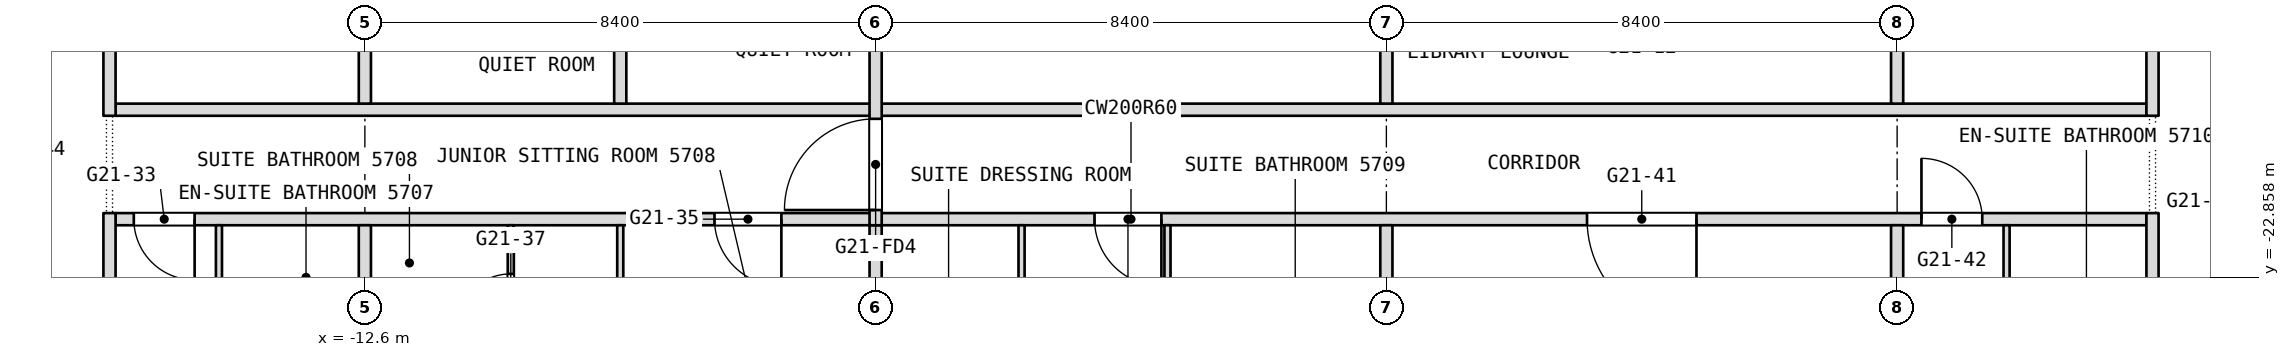
"""IFC4 building model, lengths in metres.
Left out: names, types, materials, properties, quantities, classifications, styles, units other than length and angle.
Written with IfcOpenShell. Run it as: python <this file> out.ifc"""

import sys

from ifc_helpers import new_model, si_unit, direction, frame, frame_2d, origin, place, context, subcontext, project, spatial, rectangle, extrude, element, fill, save


model = new_model("IFC4")
c1 = context("Model", 3, precision=1e-05, world=origin(), true_north=direction((0.0, 1.0)))
c2 = subcontext(c1, "Body", "Model", "MODEL_VIEW")
j1 = project(units=[si_unit("LENGTHUNIT", "METRE"), si_unit("PLANEANGLEUNIT", "RADIAN")], contexts=[c1])
p1 = place(None, origin())
s1 = spatial("IfcSite", under=j1, at=p1, CompositionType="ELEMENT")
p2 = place(p1, origin())
s2 = spatial("IfcBuilding", under=s1, at=p2, CompositionType="ELEMENT")
p3 = place(p2, frame((0.0, 0.0, 241.7)))
s3 = spatial("IfcBuildingStorey", under=s2, at=p3, CompositionType="ELEMENT", Elevation=241.7)
p4 = place(p3, frame((-16.7, -21.9, 0.0), z_axis=(0.0, 0.0, 1.0), x_axis=(1.0, 0.0, 0.0)))
e1 = element("IfcWall", 1, at=p4, inside=s3, PredefinedType="PARTITIONING", context=c2, shape_type="SweptSolid", body=[
    extrude(rectangle(XDim=33.4, YDim=0.2, at=frame_2d((16.7, 0.0))), origin(), (0.0, 0.0, 1.0), 3.34),
])
p5 = place(p4, frame((0.3, 0.0, 0.0)))
e2 = element("IfcOpeningElement", 2, at=p5, cuts=e1, PredefinedType="OPENING", context=c2, shape_type="SweptSolid", body=[
    extrude(rectangle(XDim=1.0, YDim=2.1, at=frame_2d((0.5, 1.05))), frame((0.0, 0.1, 0.0), z_axis=(0.0, -1.0, 0.0), x_axis=(1.0, 0.0, 0.0)), (0.0, 0.0, 1.0), 0.2),
])
p6 = place(p4, frame((9.85, 0.0, 0.0)))
e3 = element("IfcOpeningElement", 3, at=p6, cuts=e1, PredefinedType="OPENING", context=c2, shape_type="SweptSolid", body=[
    extrude(rectangle(XDim=1.1, YDim=2.1, at=frame_2d((0.55, 1.05))), frame((0.0, 0.1, 0.0), z_axis=(0.0, -1.0, 0.0), x_axis=(1.0, 0.0, 0.0)), (0.0, 0.0, 1.0), 0.2),
])
p7 = place(p4, frame((16.1, 0.0, 0.0)))
e4 = element("IfcOpeningElement", 4, at=p7, cuts=e1, PredefinedType="OPENING", context=c2, shape_type="SweptSolid", body=[
    extrude(rectangle(XDim=1.1, YDim=2.1, at=frame_2d((0.55, 1.05))), frame((0.0, 0.1, 0.0), z_axis=(0.0, -1.0, 0.0), x_axis=(1.0, 0.0, 0.0)), (0.0, 0.0, 1.0), 0.2),
])
p8 = place(p4, frame((24.2, 0.0, 0.0)))
e5 = element("IfcOpeningElement", 5, at=p8, cuts=e1, PredefinedType="OPENING", context=c2, shape_type="SweptSolid", body=[
    extrude(rectangle(XDim=1.8, YDim=2.1, at=frame_2d((0.9, 1.05))), frame((0.0, 0.1, 0.0), z_axis=(0.0, -1.0, 0.0), x_axis=(1.0, 0.0, 0.0)), (0.0, 0.0, 1.0), 0.2),
])
p9 = place(p4, frame((29.7, 0.0, 0.0)))
e6 = element("IfcOpeningElement", 6, at=p9, cuts=e1, PredefinedType="OPENING", context=c2, shape_type="SweptSolid", body=[
    extrude(rectangle(XDim=1.0, YDim=2.1, at=frame_2d((0.5, 1.05))), frame((0.0, 0.1, 0.0), z_axis=(0.0, -1.0, 0.0), x_axis=(1.0, 0.0, 0.0)), (0.0, 0.0, 1.0), 0.2),
])
p10 = place(p3, frame((-16.7, -20.1, 0.0), z_axis=(0.0, 0.0, 1.0), x_axis=(1.0, 0.0, 0.0)))
e7 = element("IfcWall", 7, at=p10, inside=s3, PredefinedType="PARTITIONING", context=c2, shape_type="SweptSolid", body=[
    extrude(rectangle(XDim=33.4, YDim=0.2, at=frame_2d((16.7, 0.0))), origin(), (0.0, 0.0, 1.0), 3.34),
])
p11 = place(p3, frame((16.8, -27.229, 0.0), z_axis=(0.0, 0.0, 1.0), x_axis=(0.0, 1.0, 0.0)))
e8 = element("IfcWall", 8, at=p11, inside=s3, PredefinedType="PARTITIONING", context=c2, shape_type="SweptSolid", body=[
    extrude(rectangle(XDim=5.429, YDim=0.2, at=frame_2d((2.714, 0.0))), origin(), (0.0, 0.0, 1.0), 3.34),
])
p12 = place(p3, frame((16.8, -20.2, 0.0), z_axis=(0.0, 0.0, 1.0), x_axis=(0.0, 1.0, 0.0)))
e9 = element("IfcWall", 9, at=p12, inside=s3, PredefinedType="PARTITIONING", context=c2, shape_type="SweptSolid", body=[
    extrude(rectangle(XDim=6.8, YDim=0.2, at=frame_2d((3.4, 0.0))), origin(), (0.0, 0.0, 1.0), 3.34),
])
p13 = place(p3, frame((14.4, -24.95, 0.0), z_axis=(0.0, 0.0, 1.0), x_axis=(0.0, 1.0, 0.0)))
e10 = element("IfcWall", 10, at=p13, inside=s3, PredefinedType="PARTITIONING", context=c2, shape_type="SweptSolid", body=[
    extrude(rectangle(XDim=2.95, YDim=0.1, at=frame_2d((1.475, 0.0))), origin(), (0.0, 0.0, 1.0), 3.34),
])
p14 = place(p3, frame((12.6, -28.343, 0.0), z_axis=(0.0, 0.0, 1.0), x_axis=(0.0, 1.0, 0.0)))
e11 = element("IfcWall", 11, at=p14, inside=s3, PredefinedType="PARTITIONING", context=c2, shape_type="SweptSolid", body=[
    extrude(rectangle(XDim=6.343, YDim=0.2, at=frame_2d((3.171, 0.0))), origin(), (0.0, 0.0, 1.0), 3.34),
])
p15 = place(p3, frame((12.6, -20.0, 0.0), z_axis=(0.0, 0.0, 1.0), x_axis=(0.0, 1.0, 0.0)))
e12 = element("IfcWall", 12, at=p15, inside=s3, PredefinedType="PARTITIONING", context=c2, shape_type="SweptSolid", body=[
    extrude(rectangle(XDim=1.5, YDim=0.2, at=frame_2d((0.75, 0.0))), origin(), (0.0, 0.0, 1.0), 3.34),
])
p16 = place(p3, frame((4.2, -28.9, 0.0), z_axis=(0.0, 0.0, 1.0), x_axis=(0.0, 1.0, 0.0)))
e13 = element("IfcWall", 13, at=p16, inside=s3, PredefinedType="PARTITIONING", context=c2, shape_type="SweptSolid", body=[
    extrude(rectangle(XDim=6.9, YDim=0.2, at=frame_2d((3.45, 0.0))), origin(), (0.0, 0.0, 1.0), 3.34),
])
p17 = place(p3, frame((4.2, -20.0, 0.0), z_axis=(0.0, 0.0, 1.0), x_axis=(0.0, 1.0, 0.0)))
e14 = element("IfcWall", 14, at=p17, inside=s3, PredefinedType="PARTITIONING", context=c2, shape_type="SweptSolid", body=[
    extrude(rectangle(XDim=6.4, YDim=0.2, at=frame_2d((3.2, 0.0))), origin(), (0.0, 0.0, 1.0), 3.34),
])
p18 = place(p3, frame((0.6, -25.55, 0.0), z_axis=(0.0, 0.0, 1.0), x_axis=(0.0, 1.0, 0.0)))
e15 = element("IfcWall", 15, at=p18, inside=s3, PredefinedType="PARTITIONING", context=c2, shape_type="SweptSolid", body=[
    extrude(rectangle(XDim=3.55, YDim=0.1, at=frame_2d((1.775, 0.0))), origin(), (0.0, 0.0, 1.0), 3.34),
])
p19 = place(p3, frame((-1.8, -25.45, 0.0), z_axis=(0.0, 0.0, 1.0), x_axis=(0.0, 1.0, 0.0)))
e16 = element("IfcWall", 16, at=p19, inside=s3, PredefinedType="PARTITIONING", context=c2, shape_type="SweptSolid", body=[
    extrude(rectangle(XDim=3.45, YDim=0.1, at=frame_2d((1.725, 0.0))), origin(), (0.0, 0.0, 1.0), 3.34),
])
p20 = place(p3, frame((-4.2, -28.9, 0.0), z_axis=(0.0, 0.0, 1.0), x_axis=(0.0, 1.0, 0.0)))
e17 = element("IfcWall", 17, at=p20, inside=s3, PredefinedType="PARTITIONING", context=c2, shape_type="SweptSolid", body=[
    extrude(rectangle(XDim=6.9, YDim=0.2, at=frame_2d((3.45, 0.0))), origin(), (0.0, 0.0, 1.0), 3.34),
])
p21 = place(p3, frame((-4.2, -22.0, 0.0), z_axis=(0.0, 0.0, 1.0), x_axis=(0.0, 1.0, 0.0)))
e18 = element("IfcWall", 18, at=p21, inside=s3, PredefinedType="PARTITIONING", context=c2, shape_type="SweptSolid", body=[
    extrude(rectangle(XDim=8.4, YDim=0.2, at=frame_2d((4.2, 0.0))), origin(), (0.0, 0.0, 1.0), 3.34),
])
p22 = place(p21, frame((0.25, 0.0, 0.0)))
e19 = element("IfcOpeningElement", 19, at=p22, cuts=e18, PredefinedType="OPENING", context=c2, shape_type="SweptSolid", body=[
    extrude(rectangle(XDim=1.5, YDim=2.1, at=frame_2d((0.75, 1.05))), frame((0.0, 0.1, 0.0), z_axis=(0.0, -1.0, 0.0), x_axis=(1.0, 0.0, 0.0)), (0.0, 0.0, 1.0), 0.2),
])
p23 = place(p3, frame((-8.4, -28.9, 0.0), z_axis=(0.0, 0.0, 1.0), x_axis=(0.0, 1.0, 0.0)))
e20 = element("IfcWall", 20, at=p23, inside=s3, PredefinedType="PARTITIONING", context=c2, shape_type="SweptSolid", body=[
    extrude(rectangle(XDim=6.9, YDim=0.1, at=frame_2d((3.45, 0.0))), origin(), (0.0, 0.0, 1.0), 3.34),
])
p24 = place(p23, frame((2.53, 0.0, 0.0)))
e21 = element("IfcOpeningElement", 21, at=p24, cuts=e20, PredefinedType="OPENING", context=c2, shape_type="SweptSolid", body=[
    extrude(rectangle(XDim=0.9, YDim=2.1, at=frame_2d((0.45, 1.05))), frame((0.0, 0.05, 0.0), z_axis=(0.0, -1.0, 0.0), x_axis=(1.0, 0.0, 0.0)), (0.0, 0.0, 1.0), 0.1),
])
p25 = place(p3, frame((-8.4, -20.0, 0.0), z_axis=(0.0, 0.0, 1.0), x_axis=(0.0, 1.0, 0.0)))
e22 = element("IfcWall", 22, at=p25, inside=s3, PredefinedType="PARTITIONING", context=c2, shape_type="SweptSolid", body=[
    extrude(rectangle(XDim=1.5, YDim=0.2, at=frame_2d((0.75, 0.0))), origin(), (0.0, 0.0, 1.0), 3.34),
])
p26 = place(p3, frame((-10.2, -24.55, 0.0), z_axis=(0.0, 0.0, 1.0), x_axis=(0.0, 1.0, 0.0)))
e23 = element("IfcWall", 23, at=p26, inside=s3, PredefinedType="PARTITIONING", context=c2, shape_type="SweptSolid", body=[
    extrude(rectangle(XDim=2.55, YDim=0.1, at=frame_2d((1.275, 0.0))), origin(), (0.0, 0.0, 1.0), 3.34),
])
p27 = place(p26, frame((0.85, 0.0, 0.0)))
e24 = element("IfcOpeningElement", 24, at=p27, cuts=e23, PredefinedType="OPENING", context=c2, shape_type="SweptSolid", body=[
    extrude(rectangle(XDim=0.9, YDim=2.1, at=frame_2d((0.45, 1.05))), frame((0.0, 0.05, 0.0), z_axis=(0.0, -1.0, 0.0), x_axis=(1.0, 0.0, 0.0)), (0.0, 0.0, 1.0), 0.1),
])
p28 = place(p3, frame((-12.6, -28.343, 0.0), z_axis=(0.0, 0.0, 1.0), x_axis=(0.0, 1.0, 0.0)))
e25 = element("IfcWall", 25, at=p28, inside=s3, PredefinedType="PARTITIONING", context=c2, shape_type="SweptSolid", body=[
    extrude(rectangle(XDim=6.343, YDim=0.2, at=frame_2d((3.171, 0.0))), origin(), (0.0, 0.0, 1.0), 3.34),
])
p29 = place(p3, frame((-12.6, -20.0, 0.0), z_axis=(0.0, 0.0, 1.0), x_axis=(0.0, 1.0, 0.0)))
e26 = element("IfcWall", 26, at=p29, inside=s3, PredefinedType="PARTITIONING", context=c2, shape_type="SweptSolid", body=[
    extrude(rectangle(XDim=1.5, YDim=0.2, at=frame_2d((0.75, 0.0))), origin(), (0.0, 0.0, 1.0), 3.34),
])
p30 = place(p3, frame((-15.0, -24.75, 0.0), z_axis=(0.0, 0.0, 1.0), x_axis=(0.0, 1.0, 0.0)))
e27 = element("IfcWall", 27, at=p30, inside=s3, PredefinedType="PARTITIONING", context=c2, shape_type="SweptSolid", body=[
    extrude(rectangle(XDim=2.75, YDim=0.1, at=frame_2d((1.375, 0.0))), origin(), (0.0, 0.0, 1.0), 3.34),
])
p31 = place(p3, frame((-16.8, -27.229, 0.0), z_axis=(0.0, 0.0, 1.0), x_axis=(0.0, 1.0, 0.0)))
e28 = element("IfcWall", 28, at=p31, inside=s3, PredefinedType="PARTITIONING", context=c2, shape_type="SweptSolid", body=[
    extrude(rectangle(XDim=5.429, YDim=0.2, at=frame_2d((2.714, 0.0))), origin(), (0.0, 0.0, 1.0), 3.34),
])
p32 = place(p3, frame((-16.8, -20.2, 0.0), z_axis=(0.0, 0.0, 1.0), x_axis=(0.0, 1.0, 0.0)))
e29 = element("IfcWall", 29, at=p32, inside=s3, PredefinedType="PARTITIONING", context=c2, shape_type="SweptSolid", body=[
    extrude(rectangle(XDim=6.8, YDim=0.2, at=frame_2d((3.4, 0.0))), origin(), (0.0, 0.0, 1.0), 3.34),
])
p33 = place(p5, origin())
e30 = element("IfcDoor", 30, at=p33, inside=s3, OperationType="SINGLE_SWING_RIGHT", PredefinedType="DOOR", context=c2, shape_type="SweptSolid", body=[
    extrude(rectangle(XDim=1.0, YDim=2.1, at=frame_2d((0.5, 1.05))), frame((0.0, 0.025, 0.0), z_axis=(0.0, -1.0, 0.0), x_axis=(1.0, 0.0, 0.0)), (0.0, 0.0, 1.0), 0.05),
])
fill(e2, e30)
p34 = place(p6, origin())
e31 = element("IfcDoor", 31, at=p34, inside=s3, OperationType="SINGLE_SWING_LEFT", PredefinedType="DOOR", context=c2, shape_type="SweptSolid", body=[
    extrude(rectangle(XDim=1.1, YDim=2.1, at=frame_2d((0.55, 1.05))), frame((0.0, 0.025, 0.0), z_axis=(0.0, -1.0, 0.0), x_axis=(1.0, 0.0, 0.0)), (0.0, 0.0, 1.0), 0.05),
])
fill(e3, e31)
p35 = place(p7, origin())
e32 = element("IfcDoor", 32, at=p35, inside=s3, OperationType="SINGLE_SWING_LEFT", PredefinedType="DOOR", context=c2, shape_type="SweptSolid", body=[
    extrude(rectangle(XDim=1.1, YDim=2.1, at=frame_2d((0.55, 1.05))), frame((0.0, 0.025, 0.0), z_axis=(0.0, -1.0, 0.0), x_axis=(1.0, 0.0, 0.0)), (0.0, 0.0, 1.0), 0.05),
])
fill(e4, e32)
p36 = place(p8, origin())
e33 = element("IfcDoor", 33, at=p36, inside=s3, OperationType="DOUBLE_DOOR_SINGLE_SWING", PredefinedType="DOOR", context=c2, shape_type="SweptSolid", body=[
    extrude(rectangle(XDim=1.8, YDim=2.1, at=frame_2d((0.9, 1.05))), frame((0.0, 0.025, 0.0), z_axis=(0.0, -1.0, 0.0), x_axis=(1.0, 0.0, 0.0)), (0.0, 0.0, 1.0), 0.05),
])
fill(e5, e33)
p37 = place(p9, origin())
e34 = element("IfcDoor", 34, at=p37, inside=s3, OperationType="SINGLE_SWING_RIGHT", PredefinedType="DOOR", context=c2, shape_type="SweptSolid", body=[
    extrude(rectangle(XDim=1.0, YDim=2.1, at=frame_2d((0.5, 1.05))), frame((0.0, 0.025, 0.0), z_axis=(0.0, -1.0, 0.0), x_axis=(1.0, 0.0, 0.0)), (0.0, 0.0, 1.0), 0.05),
])
fill(e6, e34)
p38 = place(p27, origin())
e35 = element("IfcDoor", 35, at=p38, inside=s3, OperationType="SINGLE_SWING_RIGHT", PredefinedType="DOOR", context=c2, shape_type="SweptSolid", body=[
    extrude(rectangle(XDim=0.9, YDim=2.1, at=frame_2d((0.45, 1.05))), frame((0.0, 0.025, 0.0), z_axis=(0.0, -1.0, 0.0), x_axis=(1.0, 0.0, 0.0)), (0.0, 0.0, 1.0), 0.05),
])
fill(e24, e35)
p39 = place(p22, origin())
e36 = element("IfcDoor", 36, at=p39, inside=s3, OperationType="DOUBLE_DOOR_DOUBLE_SWING", PredefinedType="DOOR", context=c2, shape_type="SweptSolid", body=[
    extrude(rectangle(XDim=1.5, YDim=2.1, at=frame_2d((0.75, 1.05))), frame((0.0, 0.025, 0.0), z_axis=(0.0, -1.0, 0.0), x_axis=(1.0, 0.0, 0.0)), (0.0, 0.0, 1.0), 0.05),
])
fill(e19, e36)
save(model, sys.argv[1])
